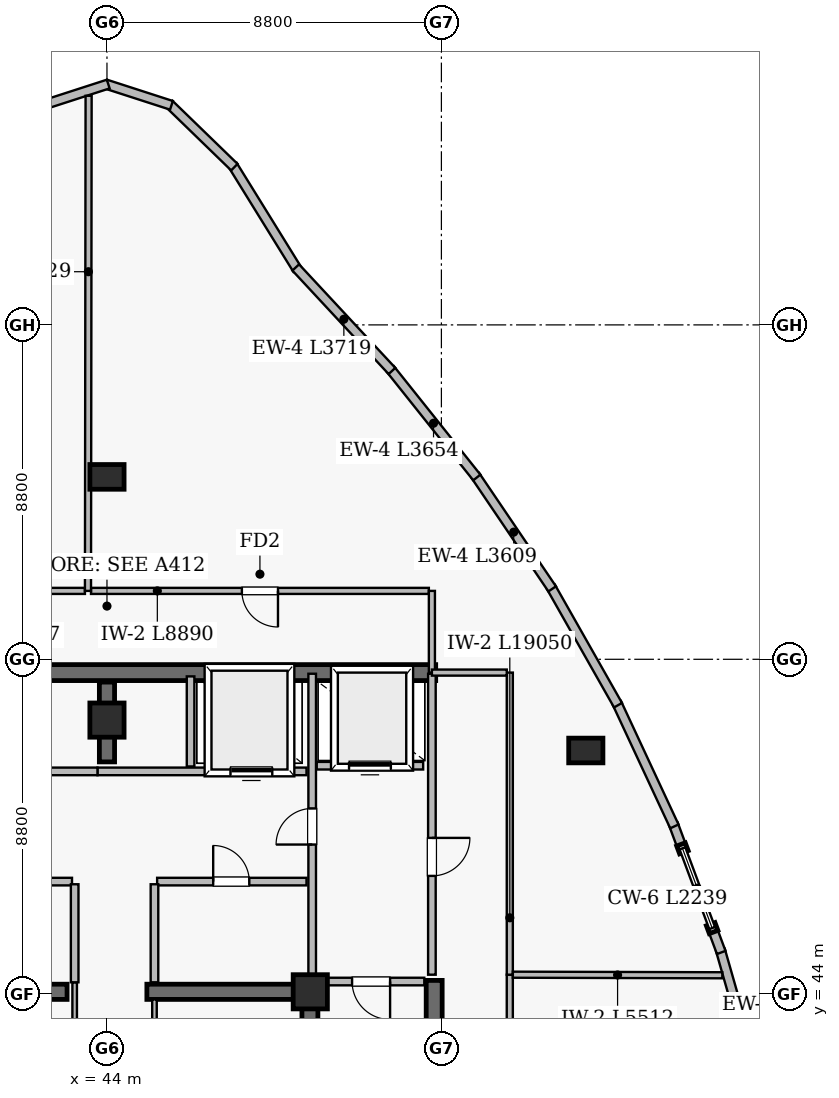
"""IFC4 building model, lengths in metres.
Left out: names, types, materials, properties, quantities, classifications, styles, units other than length and angle.
Written with IfcOpenShell. Run it as: python <this file> out.ifc"""

import sys

from ifc_helpers import new_model, si_unit, direction, frame, frame_2d, origin, origin_2d, place, context, subcontext, project, spatial, rectangle, extrude, element, fill, save


model = new_model("IFC4")
c1 = context("Model", 3, precision=1e-05, world=origin(), true_north=direction((0.0, 1.0)))
c2 = subcontext(c1, "Body", "Model", "MODEL_VIEW")
j1 = project(units=[si_unit("LENGTHUNIT", "METRE"), si_unit("PLANEANGLEUNIT", "RADIAN")], contexts=[c1])
p1 = place(None, origin())
s1 = spatial("IfcSite", under=j1, at=p1, CompositionType="ELEMENT")
p2 = place(p1, origin())
s2 = spatial("IfcBuilding", under=s1, at=p2, CompositionType="ELEMENT")
p3 = place(p2, frame((0.0, 0.0, 300.8)))
s3 = spatial("IfcBuildingStorey", under=s2, at=p3, CompositionType="ELEMENT", Elevation=300.8)
p4 = place(p3, frame((35.35, 52.45, 0.0), z_axis=(0.0, 0.0, 1.0), x_axis=(1.0, 0.0, 0.0)))
e1 = element("IfcWall", 1, at=p4, inside=s3, PredefinedType="SHEAR", context=c2, shape_type="SweptSolid", body=[
    extrude(rectangle(XDim=17.3, YDim=0.42, at=frame_2d((8.65, 0.0))), origin(), (0.0, 0.0, 1.0), 5.74),
])
p5 = place(p3, frame((52.61, 35.18, 0.0), z_axis=(0.0, 0.0, 1.0), x_axis=(0.0, 1.0, 0.0)))
e2 = element("IfcWall", 2, at=p5, inside=s3, PredefinedType="SHEAR", context=c2, shape_type="SweptSolid", body=[
    extrude(rectangle(XDim=9.17, YDim=0.42, at=frame_2d((4.585, 0.0))), origin(), (0.0, 0.0, 1.0), 5.74),
])
p6 = place(p3, frame((49.34, 35.4, 0.0), z_axis=(0.0, 0.0, 1.0), x_axis=(0.0, 1.0, 0.0)))
e3 = element("IfcWall", 3, at=p6, inside=s3, PredefinedType="SHEAR", context=c2, shape_type="SweptSolid", body=[
    extrude(rectangle(XDim=8.95, YDim=0.42, at=frame_2d((4.475, 0.0))), origin(), (0.0, 0.0, 1.0), 5.74),
])
p7 = place(p3, frame((44.0, 50.1, 0.0), z_axis=(0.0, 0.0, 1.0), x_axis=(0.0, 1.0, 0.0)))
e4 = element("IfcWall", 4, at=p7, inside=s3, PredefinedType="SHEAR", context=c2, shape_type="SweptSolid", body=[
    extrude(rectangle(XDim=2.1, YDim=0.4, at=frame_2d((1.05, 0.0))), origin(), (0.0, 0.0, 1.0), 5.74),
])
for number, where, z_axis, x_axis in (
    (5, (38.75, 44.05, 0.0), (0.0, 0.0, 1.0), (1.0, 0.0, 0.0)),
    (6, (45.05, 44.05, 0.0), (0.0, 0.0, 1.0), (1.0, 0.0, 0.0)),
):
    element("IfcWall", number, at=place(p3, frame(where, z_axis=z_axis, x_axis=x_axis)), inside=s3, PredefinedType="SHEAR", context=c2, shape_type="SweptSolid", body=[
        extrude(rectangle(XDim=4.2, YDim=0.4, at=frame_2d((2.1, 0.0))), origin(), (0.0, 0.0, 1.0), 5.74),
    ])
for number, where, z_axis, x_axis in (
    (7, (49.35, 44.05, 0.0), (0.0, 0.0, 1.0), (1.0, 0.0, 0.0)),
    (8, (44.0, 51.2, 0.0), (0.0, 0.0, 1.0), (1.0, 0.0, 0.0)),
):
    element("IfcColumn", number, at=place(p3, frame(where, z_axis=z_axis, x_axis=x_axis)), inside=s3, PredefinedType="COLUMN", context=c2, shape_type="SweptSolid", body=[
        extrude(rectangle(XDim=0.9, YDim=0.9, at=origin_2d()), origin(), (0.0, 0.0, 1.0), 6.0),
    ])
for number, where, z_axis, x_axis in (
    (9, (44.0, 57.6, 0.0), (0.0, 0.0, 1.0), (1.0, 0.0, 0.0)),
    (10, (56.6, 50.4, 0.0), (0.0, 0.0, 1.0), (1.0, 0.0, 0.0)),
):
    element("IfcColumn", number, at=place(p3, frame(where, z_axis=z_axis, x_axis=x_axis)), inside=s3, PredefinedType="COLUMN", context=c2, shape_type="SweptSolid", body=[
        extrude(rectangle(XDim=0.9, YDim=0.65, at=origin_2d()), origin(), (0.0, 0.0, 1.0), 6.0),
    ])
p8 = place(p3, frame((49.01, 63.056, 0.0), z_axis=(0.0, 0.0, 1.0), x_axis=(-0.526110187608, 0.850416410058, 0.0)))
e11 = element("IfcWall", 11, at=p8, inside=s3, PredefinedType="SOLIDWALL", context=c2, shape_type="SweptSolid", body=[
    extrude(rectangle(XDim=3.233, YDim=0.24, at=frame_2d((1.616, 0.0))), origin(), (0.0, 0.0, 1.0), 5.74),
])
p9 = place(p3, frame((47.352, 65.751, 0.0), z_axis=(0.0, 0.0, 1.0), x_axis=(-0.717711443968, 0.69634063733, 0.0)))
e12 = element("IfcWall", 12, at=p9, inside=s3, PredefinedType="SOLIDWALL", context=c2, shape_type="SweptSolid", body=[
    extrude(rectangle(XDim=2.388, YDim=0.24, at=frame_2d((1.194, 0.0))), origin(), (0.0, 0.0, 1.0), 5.74),
])
for number, where, z_axis, x_axis in (
    (13, (45.697, 67.378, 0.0), (0.0, 0.0, 1.0), (-0.952, 0.308, 0.0)),
    (14, (44.033, 67.938, 0.0), (0.0, 0.0, 1.0), (-0.952, -0.308, 0.0)),
):
    element("IfcWall", number, at=place(p3, frame(where, z_axis=z_axis, x_axis=x_axis)), inside=s3, PredefinedType="SOLIDWALL", context=c2, shape_type="SweptSolid", body=[
        extrude(rectangle(XDim=1.818, YDim=0.24, at=frame_2d((0.909, 0.0))), origin(), (0.0, 0.0, 1.0), 5.74),
    ])
p10 = place(p3, frame((61.146, 41.639, 0.0), z_axis=(0.0, 0.0, 1.0), x_axis=(-0.274897629025, 0.961473501224, 0.0)))
e15 = element("IfcWall", 15, at=p10, inside=s3, PredefinedType="SOLIDWALL", context=c2, shape_type="SweptSolid", body=[
    extrude(rectangle(XDim=3.654, YDim=0.24, at=frame_2d((1.827, 0.0))), origin(), (0.0, 0.0, 1.0), 5.74),
])
p11 = place(p3, frame((60.163, 45.085, 0.0), z_axis=(0.0, 0.0, 1.0), x_axis=(-0.349073246867, 0.937095442483, 0.0)))
e16 = element("IfcWall", 16, at=p11, inside=s3, PredefinedType="SOLIDWALL", context=c2, shape_type="SweptSolid", body=[
    extrude(rectangle(XDim=0.705, YDim=0.24, at=frame_2d((0.353, 0.0))), origin(), (0.0, 0.0, 1.0), 5.74),
])
p12 = place(p3, frame((59.15, 47.806, 0.0), z_axis=(0.0, 0.0, 1.0), x_axis=(-0.348960000238, 0.937137619688, 0.0)))
e17 = element("IfcWall", 17, at=p12, inside=s3, PredefinedType="SOLIDWALL", context=c2, shape_type="SweptSolid", body=[
    extrude(rectangle(XDim=0.705, YDim=0.24, at=frame_2d((0.353, 0.0))), origin(), (0.0, 0.0, 1.0), 5.74),
])
p13 = place(p3, frame((58.931, 48.403, 0.0), z_axis=(0.0, 0.0, 1.0), x_axis=(-0.422322757118, 0.906445524464, 0.0)))
e18 = element("IfcWall", 18, at=p13, inside=s3, PredefinedType="SOLIDWALL", context=c2, shape_type="SweptSolid", body=[
    extrude(rectangle(XDim=3.587, YDim=0.24, at=frame_2d((1.793, 0.0))), origin(), (0.0, 0.0, 1.0), 5.74),
])
p14 = place(p3, frame((57.448, 51.592, 0.0), z_axis=(0.0, 0.0, 1.0), x_axis=(-0.49340236427, 0.869801188165, 0.0)))
e19 = element("IfcWall", 19, at=p14, inside=s3, PredefinedType="SOLIDWALL", context=c2, shape_type="SweptSolid", body=[
    extrude(rectangle(XDim=3.587, YDim=0.24, at=frame_2d((1.793, 0.0))), origin(), (0.0, 0.0, 1.0), 5.74),
])
p15 = place(p3, frame((55.715, 54.653, 0.0), z_axis=(0.0, 0.0, 1.0), x_axis=(-0.560819727484, 0.827937940467, 0.0)))
e20 = element("IfcWall", 20, at=p15, inside=s3, PredefinedType="SOLIDWALL", context=c2, shape_type="SweptSolid", body=[
    extrude(rectangle(XDim=3.609, YDim=0.24, at=frame_2d((1.805, 0.0))), origin(), (0.0, 0.0, 1.0), 5.74),
])
p16 = place(p3, frame((53.732, 57.584, 0.0), z_axis=(0.0, 0.0, 1.0), x_axis=(-0.623626980574, 0.781722066402, 0.0)))
e21 = element("IfcWall", 21, at=p16, inside=s3, PredefinedType="SOLIDWALL", context=c2, shape_type="SweptSolid", body=[
    extrude(rectangle(XDim=3.654, YDim=0.24, at=frame_2d((1.827, 0.0))), origin(), (0.0, 0.0, 1.0), 5.74),
])
p17 = place(p3, frame((51.5, 60.388, 0.0), z_axis=(0.0, 0.0, 1.0), x_axis=(-0.68087147599, 0.732402917241, 0.0)))
e22 = element("IfcWall", 22, at=p17, inside=s3, PredefinedType="SOLIDWALL", context=c2, shape_type="SweptSolid", body=[
    extrude(rectangle(XDim=3.719, YDim=0.24, at=frame_2d((1.859, 0.0))), origin(), (0.0, 0.0, 1.0), 5.74),
])
p18 = place(p3, frame((54.6, 33.4, 0.0), z_axis=(0.0, 0.0, 1.0), x_axis=(0.0, 1.0, 0.0)))
e23 = element("IfcWall", 23, at=p18, inside=s3, PredefinedType="SOLIDWALL", context=c2, shape_type="SweptSolid", body=[
    extrude(rectangle(XDim=11.1, YDim=0.16, at=frame_2d((5.55, 0.0))), origin(), (0.0, 0.0, 1.0), 5.24),
])
p19 = place(p18, frame((4.715, 0.0, 0.0)))
e24 = element("IfcOpeningElement", 24, at=p19, cuts=e23, PredefinedType="OPENING", context=c2, shape_type="SweptSolid", body=[
    extrude(rectangle(XDim=0.95, YDim=2.15, at=frame_2d((0.475, 1.075))), frame((0.0, 0.09, 0.0), z_axis=(0.0, -1.0, 0.0), x_axis=(1.0, 0.0, 0.0)), (0.0, 0.0, 1.0), 0.18),
])
p20 = place(p3, frame((43.42, 54.6, 0.0), z_axis=(0.0, 0.0, 1.0), x_axis=(-1.0, 0.0, 0.0)))
e25 = element("IfcWall", 25, at=p20, inside=s3, PredefinedType="SOLIDWALL", context=c2, shape_type="SweptSolid", body=[
    extrude(rectangle(XDim=11.007, YDim=0.16, at=frame_2d((5.503, 0.0))), origin(), (0.0, 0.0, 1.0), 5.24),
])
p21 = place(p20, frame((5.029, 0.0, 0.0)))
e26 = element("IfcOpeningElement", 26, at=p21, cuts=e25, PredefinedType="OPENING", context=c2, shape_type="SweptSolid", body=[
    extrude(rectangle(XDim=0.95, YDim=2.15, at=frame_2d((0.475, 1.075))), frame((0.0, 0.09, 0.0), z_axis=(0.0, -1.0, 0.0), x_axis=(1.0, 0.0, 0.0)), (0.0, 0.0, 1.0), 0.18),
])
p22 = place(p3, frame((52.47, 54.6, 0.0), z_axis=(0.0, 0.0, 1.0), x_axis=(-1.0, 0.0, 0.0)))
e27 = element("IfcWall", 27, at=p22, inside=s3, PredefinedType="SOLIDWALL", context=c2, shape_type="SweptSolid", body=[
    extrude(rectangle(XDim=8.89, YDim=0.16, at=frame_2d((4.445, 0.0))), origin(), (0.0, 0.0, 1.0), 5.24),
])
p23 = place(p22, frame((3.97, 0.0, 0.0)))
e28 = element("IfcOpeningElement", 28, at=p23, cuts=e27, PredefinedType="OPENING", context=c2, shape_type="SweptSolid", body=[
    extrude(rectangle(XDim=0.95, YDim=2.15, at=frame_2d((0.475, 1.075))), frame((0.0, 0.09, 0.0), z_axis=(0.0, -1.0, 0.0), x_axis=(1.0, 0.0, 0.0)), (0.0, 0.0, 1.0), 0.18),
])
p24 = place(p3, frame((43.15, 35.6, 0.0), z_axis=(0.0, 0.0, 1.0), x_axis=(0.0, 1.0, 0.0)))
e29 = element("IfcWall", 29, at=p24, inside=s3, PredefinedType="PARTITIONING", context=c2, shape_type="SweptSolid", body=[
    extrude(rectangle(XDim=8.7, YDim=0.12, at=frame_2d((4.35, 0.0))), origin(), (0.0, 0.0, 1.0), 5.74),
])
p25 = place(p24, frame((0.925, 0.0, 0.0)))
e30 = element("IfcOpeningElement", 30, at=p25, cuts=e29, PredefinedType="OPENING", context=c2, shape_type="SweptSolid", body=[
    extrude(rectangle(XDim=0.85, YDim=2.1, at=frame_2d((0.425, 1.05))), frame((0.0, 0.07, 0.0), z_axis=(0.0, -1.0, 0.0), x_axis=(1.0, 0.0, 0.0)), (0.0, 0.0, 1.0), 0.14),
])
p26 = place(p24, frame((3.695, 0.0, 0.0)))
e31 = element("IfcOpeningElement", 31, at=p26, cuts=e29, PredefinedType="OPENING", context=c2, shape_type="SweptSolid", body=[
    extrude(rectangle(XDim=0.85, YDim=2.1, at=frame_2d((0.425, 1.05))), frame((0.0, 0.07, 0.0), z_axis=(0.0, -1.0, 0.0), x_axis=(1.0, 0.0, 0.0)), (0.0, 0.0, 1.0), 0.14),
])
p27 = place(p24, frame((6.475, 0.0, 0.0)))
e32 = element("IfcOpeningElement", 32, at=p27, cuts=e29, PredefinedType="OPENING", context=c2, shape_type="SweptSolid", body=[
    extrude(rectangle(XDim=0.85, YDim=2.1, at=frame_2d((0.425, 1.05))), frame((0.0, 0.07, 0.0), z_axis=(0.0, -1.0, 0.0), x_axis=(1.0, 0.0, 0.0)), (0.0, 0.0, 1.0), 0.14),
])
p28 = place(p3, frame((45.25, 35.6, 0.0), z_axis=(0.0, 0.0, 1.0), x_axis=(0.0, 1.0, 0.0)))
e33 = element("IfcWall", 33, at=p28, inside=s3, PredefinedType="PARTITIONING", context=c2, shape_type="SweptSolid", body=[
    extrude(rectangle(XDim=8.25, YDim=0.12, at=frame_2d((4.125, 0.0))), origin(), (0.0, 0.0, 1.0), 5.74),
])
p29 = place(p28, frame((1.55, 0.0, 0.0)))
e34 = element("IfcOpeningElement", 34, at=p29, cuts=e33, PredefinedType="OPENING", context=c2, shape_type="SweptSolid", body=[
    extrude(rectangle(XDim=0.9, YDim=2.1, at=frame_2d((0.45, 1.05))), frame((0.0, 0.07, 0.0), z_axis=(0.0, -1.0, 0.0), x_axis=(1.0, 0.0, 0.0)), (0.0, 0.0, 1.0), 0.14),
])
p30 = place(p28, frame((5.75, 0.0, 0.0)))
e35 = element("IfcOpeningElement", 35, at=p30, cuts=e33, PredefinedType="OPENING", context=c2, shape_type="SweptSolid", body=[
    extrude(rectangle(XDim=0.9, YDim=2.1, at=frame_2d((0.45, 1.05))), frame((0.0, 0.07, 0.0), z_axis=(0.0, -1.0, 0.0), x_axis=(1.0, 0.0, 0.0)), (0.0, 0.0, 1.0), 0.14),
])
p31 = place(p3, frame((52.55, 44.5, 0.0), z_axis=(0.0, 0.0, 1.0), x_axis=(0.0, 1.0, 0.0)))
e36 = element("IfcWall", 36, at=p31, inside=s3, PredefinedType="SOLIDWALL", context=c2, shape_type="SweptSolid", body=[
    extrude(rectangle(XDim=7.92, YDim=0.2, at=frame_2d((3.96, 0.0))), origin(), (0.0, 0.0, 1.0), 5.74),
])
p32 = place(p31, frame((2.6, 0.0, 0.0)))
e37 = element("IfcOpeningElement", 37, at=p32, cuts=e36, PredefinedType="OPENING", context=c2, shape_type="SweptSolid", body=[
    extrude(rectangle(XDim=1.0, YDim=2.15, at=frame_2d((0.5, 1.075))), frame((0.0, 0.11, 0.0), z_axis=(0.0, -1.0, 0.0), x_axis=(1.0, 0.0, 0.0)), (0.0, 0.0, 1.0), 0.22),
])
p33 = place(p3, frame((49.4, 44.5, 0.0), z_axis=(0.0, 0.0, 1.0), x_axis=(0.0, 1.0, 0.0)))
e38 = element("IfcWall", 38, at=p33, inside=s3, PredefinedType="SOLIDWALL", context=c2, shape_type="SweptSolid", body=[
    extrude(rectangle(XDim=7.92, YDim=0.2, at=frame_2d((3.96, 0.0))), origin(), (0.0, 0.0, 1.0), 4.828),
])
p34 = place(p33, frame((3.425, 0.0, 0.0)))
e39 = element("IfcOpeningElement", 39, at=p34, cuts=e38, PredefinedType="OPENING", context=c2, shape_type="SweptSolid", body=[
    extrude(rectangle(XDim=0.95, YDim=2.15, at=frame_2d((0.475, 1.075))), frame((0.0, 0.11, 0.0), z_axis=(0.0, -1.0, 0.0), x_axis=(1.0, 0.0, 0.0)), (0.0, 0.0, 1.0), 0.22),
])
p35 = place(p3, frame((43.75, 49.85, 0.0), z_axis=(0.0, 0.0, 1.0), x_axis=(1.0, 0.0, 0.0)))
e40 = element("IfcWall", 40, at=p35, inside=s3, PredefinedType="SOLIDWALL", context=c2, shape_type="SweptSolid", body=[
    extrude(rectangle(XDim=5.5, YDim=0.2, at=frame_2d((2.75, 0.0))), origin(), (0.0, 0.0, 1.0), 4.828),
])
p36 = place(p35, frame((3.5, 0.0, 0.0)))
e41 = element("IfcOpeningElement", 41, at=p36, cuts=e40, PredefinedType="OPENING", context=c2, shape_type="SweptSolid", body=[
    extrude(rectangle(XDim=1.1, YDim=2.15, at=frame_2d((0.55, 1.075))), frame((0.0, 0.11, 0.0), z_axis=(0.0, -1.0, 0.0), x_axis=(1.0, 0.0, 0.0)), (0.0, 0.0, 1.0), 0.22),
])
p37 = place(p3, frame((38.75, 46.95, 0.0), z_axis=(0.0, 0.0, 1.0), x_axis=(1.0, 0.0, 0.0)))
e42 = element("IfcWall", 42, at=p37, inside=s3, PredefinedType="SOLIDWALL", context=c2, shape_type="SweptSolid", body=[
    extrude(rectangle(XDim=4.33, YDim=0.2, at=frame_2d((2.165, 0.0))), origin(), (0.0, 0.0, 1.0), 5.74),
])
p38 = place(p37, frame((1.675, 0.0, 0.0)))
e43 = element("IfcOpeningElement", 43, at=p38, cuts=e42, PredefinedType="OPENING", context=c2, shape_type="SweptSolid", body=[
    extrude(rectangle(XDim=0.95, YDim=2.1, at=frame_2d((0.475, 1.05))), frame((0.0, 0.11, 0.0), z_axis=(0.0, -1.0, 0.0), x_axis=(1.0, 0.0, 0.0)), (0.0, 0.0, 1.0), 0.22),
])
p39 = place(p3, frame((45.32, 46.95, 0.0), z_axis=(0.0, 0.0, 1.0), x_axis=(1.0, 0.0, 0.0)))
e44 = element("IfcWall", 44, at=p39, inside=s3, PredefinedType="SOLIDWALL", context=c2, shape_type="SweptSolid", body=[
    extrude(rectangle(XDim=3.93, YDim=0.2, at=frame_2d((1.965, 0.0))), origin(), (0.0, 0.0, 1.0), 4.828),
])
p40 = place(p39, frame((1.475, 0.0, 0.0)))
e45 = element("IfcOpeningElement", 45, at=p40, cuts=e44, PredefinedType="OPENING", context=c2, shape_type="SweptSolid", body=[
    extrude(rectangle(XDim=0.95, YDim=2.1, at=frame_2d((0.475, 1.05))), frame((0.0, 0.11, 0.0), z_axis=(0.0, -1.0, 0.0), x_axis=(1.0, 0.0, 0.0)), (0.0, 0.0, 1.0), 0.22),
])
p41 = place(p3, frame((49.55, 44.32, 0.0), z_axis=(0.0, 0.0, 1.0), x_axis=(1.0, 0.0, 0.0)))
e46 = element("IfcWall", 46, at=p41, inside=s3, PredefinedType="SOLIDWALL", context=c2, shape_type="SweptSolid", body=[
    extrude(rectangle(XDim=2.8, YDim=0.2, at=frame_2d((1.4, 0.0))), origin(), (0.0, 0.0, 1.0), 4.828),
])
p42 = place(p41, frame((0.9, 0.0, 0.0)))
e47 = element("IfcOpeningElement", 47, at=p42, cuts=e46, PredefinedType="OPENING", context=c2, shape_type="SweptSolid", body=[
    extrude(rectangle(XDim=1.0, YDim=2.15, at=frame_2d((0.5, 1.075))), frame((0.0, 0.11, 0.0), z_axis=(0.0, -1.0, 0.0), x_axis=(1.0, 0.0, 0.0)), (0.0, 0.0, 1.0), 0.22),
])
p43 = place(p3, frame((49.52, 50.0, 0.0), z_axis=(0.0, 0.0, 1.0), x_axis=(1.0, 0.0, 0.0)))
e48 = element("IfcWall", 48, at=p43, inside=s3, PredefinedType="SOLIDWALL", context=c2, shape_type="SweptSolid", body=[
    extrude(rectangle(XDim=2.8, YDim=0.2, at=frame_2d((1.4, 0.0))), origin(), (0.0, 0.0, 1.0), 5.74),
])
p44 = place(p43, frame((0.85, 0.0, 0.0)))
e49 = element("IfcOpeningElement", 49, at=p44, cuts=e48, PredefinedType="OPENING", context=c2, shape_type="SweptSolid", body=[
    extrude(rectangle(XDim=1.1, YDim=2.15, at=frame_2d((0.55, 1.075))), frame((0.0, 0.11, 0.0), z_axis=(0.0, -1.0, 0.0), x_axis=(1.0, 0.0, 0.0)), (0.0, 0.0, 1.0), 0.22),
])
p45 = place(p3, frame((43.5, 54.6, 0.0), z_axis=(0.0, 0.0, 1.0), x_axis=(0.001311695457, 0.999999139727, 0.0)))
e50 = element("IfcWall", 50, at=p45, inside=s3, PredefinedType="SOLIDWALL", context=c2, shape_type="SweptSolid", body=[
    extrude(rectangle(XDim=13.029, YDim=0.16, at=frame_2d((6.514, 0.0))), origin(), (0.0, 0.0, 1.0), 5.24),
])
p46 = place(p3, frame((54.6, 44.5, 0.0), z_axis=(0.0, 0.0, 1.0), x_axis=(0.0, 1.0, 0.0)))
e51 = element("IfcWall", 51, at=p46, inside=s3, PredefinedType="SOLIDWALL", context=c2, shape_type="SweptSolid", body=[
    extrude(rectangle(XDim=7.95, YDim=0.16, at=frame_2d((3.975, 0.0))), origin(), (0.0, 0.0, 1.0), 5.24),
])
p47 = place(p3, frame((60.192, 44.485, 0.0), z_axis=(0.0, 0.0, 1.0), x_axis=(-0.999996349983, 0.002701854868, 0.0)))
e52 = element("IfcWall", 52, at=p47, inside=s3, PredefinedType="SOLIDWALL", context=c2, shape_type="SweptSolid", body=[
    extrude(rectangle(XDim=5.512, YDim=0.16, at=frame_2d((2.756, 0.0))), origin(), (0.0, 0.0, 1.0), 5.24),
])
p48 = place(p3, frame((38.75, 49.85, 0.0), z_axis=(0.0, 0.0, 1.0), x_axis=(1.0, 0.0, 0.0)))
e53 = element("IfcWall", 53, at=p48, inside=s3, PredefinedType="SOLIDWALL", context=c2, shape_type="SweptSolid", body=[
    extrude(rectangle(XDim=5.0, YDim=0.2, at=frame_2d((2.5, 0.0))), origin(), (0.0, 0.0, 1.0), 5.74),
])
for number, where, z_axis, x_axis in (
    (54, (43.15, 44.3, 0.0), (0.0, 0.0, 1.0), (0.0, 1.0, 0.0)),
    (55, (45.25, 44.3, 0.0), (0.0, 0.0, 1.0), (0.0, 1.0, 0.0)),
):
    element("IfcWall", number, at=place(p3, frame(where, z_axis=z_axis, x_axis=x_axis)), inside=s3, PredefinedType="SOLIDWALL", context=c2, shape_type="SweptSolid", body=[
        extrude(rectangle(XDim=2.58, YDim=0.2, at=frame_2d((1.29, 0.0))), origin(), (0.0, 0.0, 1.0), 5.74),
    ])
p49 = place(p3, frame((46.2, 49.98, 0.0), z_axis=(0.0, 0.0, 1.0), x_axis=(0.0, 1.0, 0.0)))
e56 = element("IfcWall", 56, at=p49, inside=s3, PredefinedType="SOLIDWALL", context=c2, shape_type="SweptSolid", body=[
    extrude(rectangle(XDim=2.37, YDim=0.2, at=frame_2d((1.185, 0.0))), origin(), (0.0, 0.0, 1.0), 5.74),
])
p50 = place(p3, frame((52.55, 52.45, 0.0), z_axis=(0.0, 0.0, 1.0), x_axis=(0.0, 1.0, 0.0)))
e57 = element("IfcWall", 57, at=p50, inside=s3, PredefinedType="SOLIDWALL", context=c2, shape_type="SweptSolid", body=[
    extrude(rectangle(XDim=2.15, YDim=0.16, at=frame_2d((1.075, 0.0))), origin(), (0.0, 0.0, 1.0), 5.24),
])
p51 = place(p3, frame((54.52, 52.45, 0.0), z_axis=(0.0, 0.0, 1.0), x_axis=(-1.0, 0.0, 0.0)))
e58 = element("IfcWall", 58, at=p51, inside=s3, PredefinedType="SOLIDWALL", context=c2, shape_type="SweptSolid", body=[
    extrude(rectangle(XDim=1.97, YDim=0.16, at=frame_2d((0.985, 0.0))), origin(), (0.0, 0.0, 1.0), 5.24),
])
p52 = place(p42, frame((1.0, 0.0, 0.0), z_axis=(0.0, 0.0, 1.0), x_axis=(-1.0, 0.0, 0.0)))
e59 = element("IfcDoor", 59, at=p52, inside=s3, OperationType="SINGLE_SWING_RIGHT", PredefinedType="DOOR", context=c2, shape_type="SweptSolid", body=[
    extrude(rectangle(XDim=1.0, YDim=2.15, at=frame_2d((0.5, 1.075))), frame((0.0, 0.025, 0.0), z_axis=(0.0, -1.0, 0.0), x_axis=(1.0, 0.0, 0.0)), (0.0, 0.0, 1.0), 0.05),
])
fill(e47, e59)
p53 = place(p32, frame((1.0, 0.0, 0.0), z_axis=(0.0, 0.0, 1.0), x_axis=(-1.0, 0.0, 0.0)))
e60 = element("IfcDoor", 60, at=p53, inside=s3, OperationType="SINGLE_SWING_RIGHT", PredefinedType="DOOR", context=c2, shape_type="SweptSolid", body=[
    extrude(rectangle(XDim=1.0, YDim=2.15, at=frame_2d((0.5, 1.075))), frame((0.0, 0.025, 0.0), z_axis=(0.0, -1.0, 0.0), x_axis=(1.0, 0.0, 0.0)), (0.0, 0.0, 1.0), 0.05),
])
fill(e37, e60)
p54 = place(p34, origin())
e61 = element("IfcDoor", 61, at=p54, inside=s3, OperationType="SINGLE_SWING_LEFT", PredefinedType="DOOR", context=c2, shape_type="SweptSolid", body=[
    extrude(rectangle(XDim=0.95, YDim=2.15, at=frame_2d((0.475, 1.075))), frame((0.0, 0.025, 0.0), z_axis=(0.0, -1.0, 0.0), x_axis=(1.0, 0.0, 0.0)), (0.0, 0.0, 1.0), 0.05),
])
fill(e39, e61)
p55 = place(p44, origin())
e62 = element("IfcDoor", 62, at=p55, inside=s3, OperationType="SLIDING_TO_LEFT", PredefinedType="DOOR", context=c2, shape_type="SweptSolid", body=[
    extrude(rectangle(XDim=1.1, YDim=2.15, at=frame_2d((0.55, 1.075))), frame((0.0, 0.025, 0.0), z_axis=(0.0, -1.0, 0.0), x_axis=(1.0, 0.0, 0.0)), (0.0, 0.0, 1.0), 0.05),
])
fill(e49, e62)
p56 = place(p36, origin())
e63 = element("IfcDoor", 63, at=p56, inside=s3, OperationType="SLIDING_TO_LEFT", PredefinedType="DOOR", context=c2, shape_type="SweptSolid", body=[
    extrude(rectangle(XDim=1.1, YDim=2.15, at=frame_2d((0.55, 1.075))), frame((0.0, 0.025, 0.0), z_axis=(0.0, -1.0, 0.0), x_axis=(1.0, 0.0, 0.0)), (0.0, 0.0, 1.0), 0.05),
])
fill(e41, e63)
p57 = place(p40, origin())
e64 = element("IfcDoor", 64, at=p57, inside=s3, OperationType="SINGLE_SWING_LEFT", PredefinedType="DOOR", context=c2, shape_type="SweptSolid", body=[
    extrude(rectangle(XDim=0.95, YDim=2.1, at=frame_2d((0.475, 1.05))), frame((0.0, 0.025, 0.0), z_axis=(0.0, -1.0, 0.0), x_axis=(1.0, 0.0, 0.0)), (0.0, 0.0, 1.0), 0.05),
])
fill(e45, e64)
p58 = place(p23, origin())
e65 = element("IfcDoor", 65, at=p58, inside=s3, OperationType="SINGLE_SWING_LEFT", PredefinedType="DOOR", context=c2, shape_type="SweptSolid", body=[
    extrude(rectangle(XDim=0.95, YDim=2.15, at=frame_2d((0.475, 1.075))), frame((0.0, 0.025, 0.0), z_axis=(0.0, -1.0, 0.0), x_axis=(1.0, 0.0, 0.0)), (0.0, 0.0, 1.0), 0.05),
])
fill(e28, e65)
save(model, sys.argv[1])
